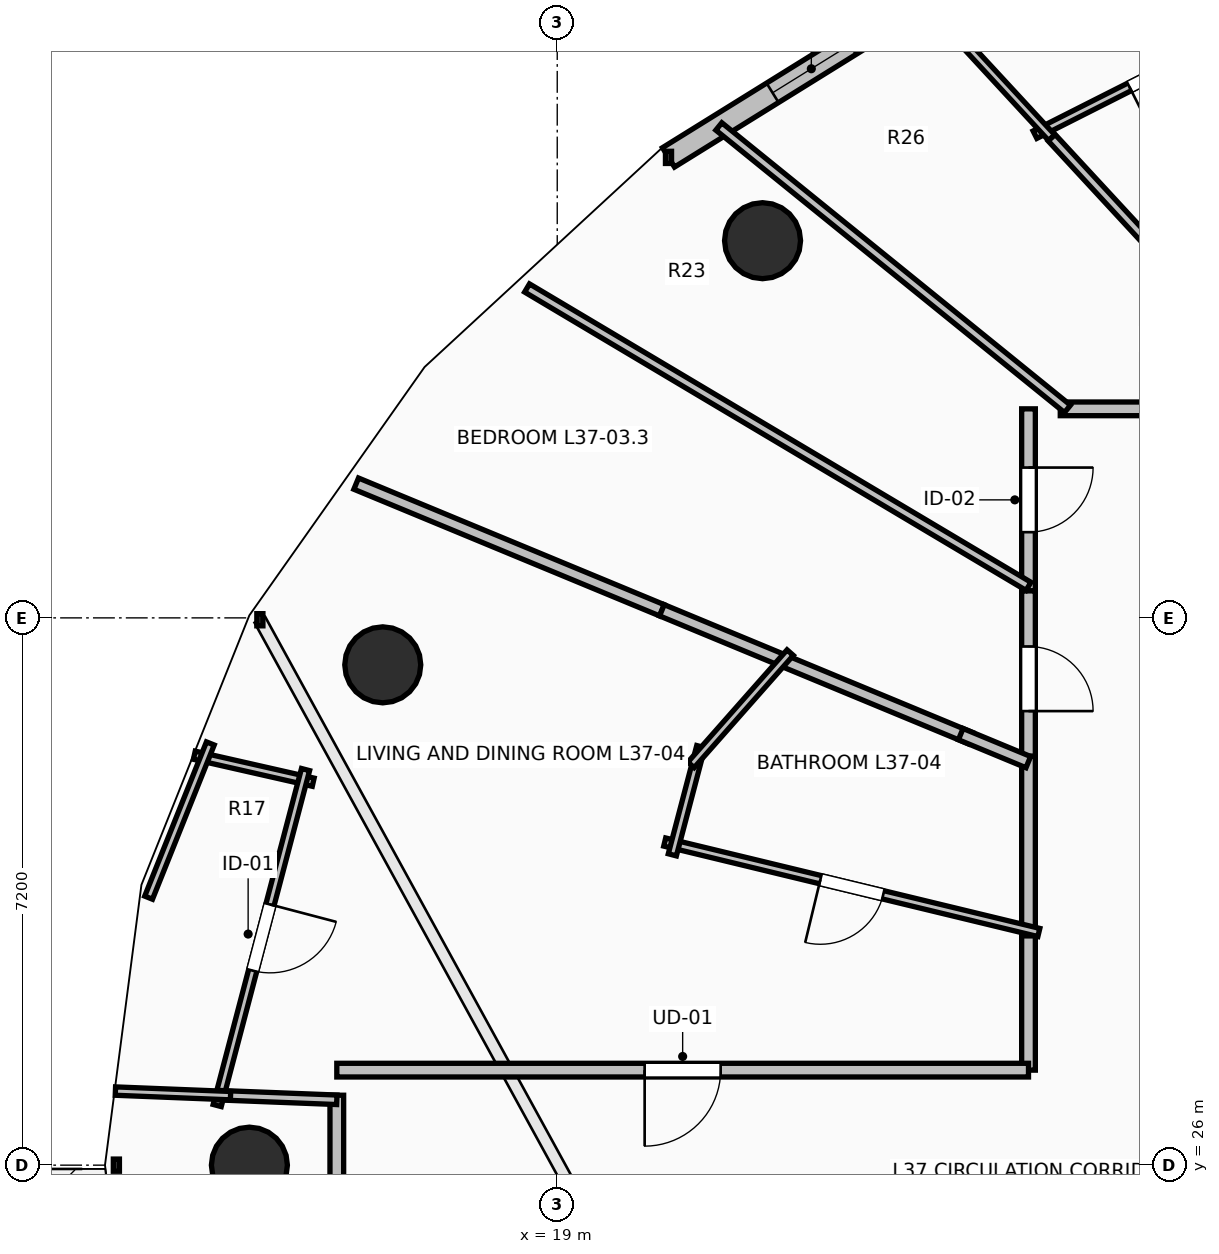
"""IFC4 building model, lengths in metres.
Left out: names, types, materials, properties, quantities, classifications, styles, units other than length and angle.
Written with IfcOpenShell. Run it as: python <this file> out.ifc"""

import sys

from ifc_helpers import new_model, si_unit, direction, frame, frame_2d, origin, origin_2d, place, context, subcontext, project, spatial, rectangle, circle, extrude, element, fill, save


model = new_model("IFC4")
c1 = context("Model", 3, precision=1e-05, world=origin(), true_north=direction((0.0, 1.0)))
c2 = subcontext(c1, "Body", "Model", "MODEL_VIEW")
j1 = project(units=[si_unit("LENGTHUNIT", "METRE"), si_unit("PLANEANGLEUNIT", "RADIAN")], contexts=[c1])
p1 = place(None, origin())
s1 = spatial("IfcSite", under=j1, at=p1, CompositionType="ELEMENT")
p2 = place(p1, origin())
s2 = spatial("IfcBuilding", under=s1, at=p2, CompositionType="ELEMENT")
p3 = place(p2, frame((0.0, 0.0, 139.6)))
s3 = spatial("IfcBuildingStorey", under=s2, at=p3, CompositionType="ELEMENT", Elevation=139.6)
for number, where, z_axis, x_axis in (
    (1, (21.701, 38.162, 0.0), (0.0, 0.0, 1.0), (-0.707, 0.707, 0.0)),
    (2, (16.705, 32.582, 0.0), (0.0, 0.0, 1.0), (-0.924, 0.383, 0.0)),
    (3, (14.95, 26.0, 0.0), (0.0, 0.0, 1.0), (-1.0, 0.0, 0.0)),
):
    element("IfcColumn", number, at=place(p3, frame(where, z_axis=z_axis, x_axis=x_axis)), inside=s3, PredefinedType="COLUMN", context=c2, shape_type="SweptSolid", body=[
        extrude(circle(Radius=0.5, at=origin_2d()), origin(), (0.0, 0.0, 1.0), 3.5),
    ])
p4 = place(p3, frame((24.222, 41.59, 0.0), z_axis=(0.0, 0.0, 1.0), x_axis=(-0.849721181976, -0.527232313977, 0.0)))
e4 = element("IfcWall", 4, at=p4, inside=s3, PredefinedType="STANDARD", context=c2, shape_type="SweptSolid", body=[
    extrude(rectangle(XDim=4.423, YDim=0.3, at=frame_2d((2.211, 0.0))), origin(), (0.0, 0.0, 1.0), 3.24),
])
p5 = place(p4, frame((1.611, 0.0, 0.85)))
e5 = element("IfcOpeningElement", 5, at=p5, cuts=e4, PredefinedType="OPENING", context=c2, shape_type="SweptSolid", body=[
    extrude(rectangle(XDim=1.2, YDim=1.95, at=frame_2d((0.6, 0.975))), frame((0.0, 0.165, 0.0), z_axis=(0.0, -1.0, 0.0), x_axis=(1.0, 0.0, 0.0)), (0.0, 0.0, 1.0), 0.33),
])
p6 = place(p3, frame((28.72, 35.95, 0.0), z_axis=(0.0, 0.0, 1.0), x_axis=(-1.0, 0.0, 0.0)))
e6 = element("IfcWall", 6, at=p6, inside=s3, PredefinedType="PARTITIONING", context=c2, shape_type="SweptSolid", body=[
    extrude(rectangle(XDim=3.102, YDim=0.18, at=frame_2d((1.551, 0.0))), origin(), (0.0, 0.0, 1.0), 2.432),
])
p7 = place(p3, frame((25.2, 35.95, 0.0), z_axis=(0.0, 0.0, 1.0), x_axis=(0.0, -1.0, 0.0)))
e7 = element("IfcWall", 7, at=p7, inside=s3, PredefinedType="PARTITIONING", context=c2, shape_type="SweptSolid", body=[
    extrude(rectangle(XDim=2.395, YDim=0.18, at=frame_2d((1.198, 0.0))), origin(), (0.0, 0.0, 1.0), 2.432),
])
p8 = place(p7, frame((0.772, 0.0, 0.0)))
e8 = element("IfcOpeningElement", 8, at=p8, cuts=e7, PredefinedType="OPENING", context=c2, shape_type="SweptSolid", body=[
    extrude(rectangle(XDim=0.85, YDim=2.1, at=frame_2d((0.425, 1.05))), frame((0.0, 0.105, 0.0), z_axis=(0.0, -1.0, 0.0), x_axis=(1.0, 0.0, 0.0)), (0.0, 0.0, 1.0), 0.21),
])
p9 = place(p3, frame((25.2, 33.555, 0.0), z_axis=(0.0, 0.0, 1.0), x_axis=(0.0, -1.0, 0.0)))
e9 = element("IfcWall", 9, at=p9, inside=s3, PredefinedType="PARTITIONING", context=c2, shape_type="SweptSolid", body=[
    extrude(rectangle(XDim=2.313, YDim=0.18, at=frame_2d((1.156, 0.0))), origin(), (0.0, 0.0, 1.0), 3.24),
])
p10 = place(p9, frame((0.731, 0.0, 0.0)))
e10 = element("IfcOpeningElement", 10, at=p10, cuts=e9, PredefinedType="OPENING", context=c2, shape_type="SweptSolid", body=[
    extrude(rectangle(XDim=0.85, YDim=2.1, at=frame_2d((0.425, 1.05))), frame((0.0, 0.105, 0.0), z_axis=(0.0, -1.0, 0.0), x_axis=(1.0, 0.0, 0.0)), (0.0, 0.0, 1.0), 0.21),
])
p11 = place(p3, frame((25.2, 29.156, 0.0), z_axis=(0.0, 0.0, 1.0), x_axis=(0.0, -1.0, 0.0)))
e11 = element("IfcWall", 11, at=p11, inside=s3, PredefinedType="PARTITIONING", context=c2, shape_type="SweptSolid", body=[
    extrude(rectangle(XDim=1.906, YDim=0.18, at=frame_2d((0.953, 0.0))), origin(), (0.0, 0.0, 1.0), 2.432),
])
p12 = place(p3, frame((25.2, 27.25, 0.0), z_axis=(0.0, 0.0, 1.0), x_axis=(-1.0, 0.0, 0.0)))
e12 = element("IfcWall", 12, at=p12, inside=s3, PredefinedType="PARTITIONING", context=c2, shape_type="SweptSolid", body=[
    extrude(rectangle(XDim=9.1, YDim=0.18, at=frame_2d((4.55, 0.0))), origin(), (0.0, 0.0, 1.0), 2.432),
])
p13 = place(p12, frame((4.05, 0.0, 0.0)))
e13 = element("IfcOpeningElement", 13, at=p13, cuts=e12, PredefinedType="OPENING", context=c2, shape_type="SweptSolid", body=[
    extrude(rectangle(XDim=1.0, YDim=2.15, at=frame_2d((0.5, 1.075))), frame((0.0, 0.105, 0.0), z_axis=(0.0, -1.0, 0.0), x_axis=(1.0, 0.0, 0.0)), (0.0, 0.0, 1.0), 0.21),
])
p14 = place(p3, frame((25.2, 31.382, 0.0), z_axis=(0.0, 0.0, 1.0), x_axis=(0.0, -1.0, 0.0)))
e14 = element("IfcWall", 14, at=p14, inside=s3, PredefinedType="PARTITIONING", context=c2, shape_type="SweptSolid", body=[
    extrude(rectangle(XDim=2.366, YDim=0.18, at=frame_2d((1.183, 0.0))), origin(), (0.0, 0.0, 1.0), 2.432),
])
p15 = place(p3, frame((16.1, 26.92, 0.0), z_axis=(0.0, 0.0, 1.0), x_axis=(0.0, -1.0, 0.0)))
e15 = element("IfcWall", 15, at=p15, inside=s3, PredefinedType="PARTITIONING", context=c2, shape_type="SweptSolid", body=[
    extrude(rectangle(XDim=2.37, YDim=0.18, at=frame_2d((1.185, 0.0))), origin(), (0.0, 0.0, 1.0), 2.432),
])
p16 = place(p3, frame((28.574, 41.219, 0.0), z_axis=(0.0, 0.0, 1.0), x_axis=(-0.892470920122, -0.451104928744, 0.0)))
e16 = element("IfcWall", 16, at=p16, inside=s3, PredefinedType="PARTITIONING", context=c2, shape_type="SweptSolid", body=[
    extrude(rectangle(XDim=3.685, YDim=0.11, at=frame_2d((1.843, 0.0))), origin(), (0.0, 0.0, 1.0), 3.24),
])
p17 = place(p16, frame((1.393, 0.0, 0.0)))
e17 = element("IfcOpeningElement", 17, at=p17, cuts=e16, PredefinedType="OPENING", context=c2, shape_type="SweptSolid", body=[
    extrude(rectangle(XDim=0.9, YDim=2.1, at=frame_2d((0.45, 1.05))), frame((0.0, 0.07, 0.0), z_axis=(0.0, -1.0, 0.0), x_axis=(1.0, 0.0, 0.0)), (0.0, 0.0, 1.0), 0.14),
])
p18 = place(p3, frame((25.505, 39.517, 0.0), z_axis=(0.0, 0.0, 1.0), x_axis=(-0.678720806978, 0.734396395808, 0.0)))
e18 = element("IfcWall", 18, at=p18, inside=s3, PredefinedType="PARTITIONING", context=c2, shape_type="SweptSolid", body=[
    extrude(rectangle(XDim=2.622, YDim=0.11, at=frame_2d((1.311, 0.0))), origin(), (0.0, 0.0, 1.0), 2.728),
])
p19 = place(p3, frame((25.505, 39.517, 0.0), z_axis=(0.0, 0.0, 1.0), x_axis=(0.678766339668, -0.734354312395, 0.0)))
e19 = element("IfcWall", 19, at=p19, inside=s3, PredefinedType="PARTITIONING", context=c2, shape_type="SweptSolid", body=[
    extrude(rectangle(XDim=4.857, YDim=0.125, at=frame_2d((2.429, 0.0))), origin(), (0.0, 0.0, 1.0), 2.432),
])
p20 = place(p19, frame((1.979, 0.0, 0.0)))
e20 = element("IfcOpeningElement", 20, at=p20, cuts=e19, PredefinedType="OPENING", context=c2, shape_type="SweptSolid", body=[
    extrude(rectangle(XDim=0.9, YDim=2.1, at=frame_2d((0.45, 1.05))), frame((0.0, 0.077, 0.0), z_axis=(0.0, -1.0, 0.0), x_axis=(1.0, 0.0, 0.0)), (0.0, 0.0, 1.0), 0.155),
])
p21 = place(p3, frame((21.126, 39.665, 0.0), z_axis=(0.0, 0.0, 1.0), x_axis=(0.777089771819, -0.629389773141, 0.0)))
e21 = element("IfcWall", 21, at=p21, inside=s3, PredefinedType="PARTITIONING", context=c2, shape_type="SweptSolid", body=[
    extrude(rectangle(XDim=5.903, YDim=0.125, at=frame_2d((2.951, 0.0))), origin(), (0.0, 0.0, 1.0), 2.728),
])
p22 = place(p3, frame((18.603, 37.54, 0.0), z_axis=(0.0, 0.0, 1.0), x_axis=(0.859389720334, -0.511321140365, 0.0)))
e22 = element("IfcWall", 22, at=p22, inside=s3, PredefinedType="PARTITIONING", context=c2, shape_type="SweptSolid", body=[
    extrude(rectangle(XDim=7.676, YDim=0.125, at=frame_2d((3.838, 0.0))), origin(), (0.0, 0.0, 1.0), 2.728),
])
p23 = place(p3, frame((16.355, 34.966, 0.0), z_axis=(0.0, 0.0, 1.0), x_axis=(0.923874659351, -0.382695197002, 0.0)))
e23 = element("IfcWall", 23, at=p23, inside=s3, PredefinedType="PARTITIONING", context=c2, shape_type="SweptSolid", body=[
    extrude(rectangle(XDim=4.353, YDim=0.16, at=frame_2d((2.177, 0.0))), origin(), (0.0, 0.0, 1.0), 2.728),
])
p24 = place(p3, frame((20.377, 33.3, 0.0), z_axis=(0.0, 0.0, 1.0), x_axis=(0.923801529802, -0.382871693306, 0.0)))
e24 = element("IfcWall", 24, at=p24, inside=s3, PredefinedType="PARTITIONING", context=c2, shape_type="SweptSolid", body=[
    extrude(rectangle(XDim=4.396, YDim=0.16, at=frame_2d((2.198, 0.0))), origin(), (0.0, 0.0, 1.0), 2.922),
])
p25 = place(p3, frame((24.309, 31.671, 0.0), z_axis=(0.0, 0.0, 1.0), x_axis=(0.923855963606, -0.38274032778, 0.0)))
e25 = element("IfcWall", 25, at=p25, inside=s3, PredefinedType="PARTITIONING", context=c2, shape_type="SweptSolid", body=[
    extrude(rectangle(XDim=0.962, YDim=0.16, at=frame_2d((0.481, 0.0))), origin(), (0.0, 0.0, 1.0), 2.972),
])
p26 = place(p3, frame((25.336, 29.061, 0.0), z_axis=(0.0, 0.0, 1.0), x_axis=(-0.972001766098, 0.234973544686, 0.0)))
e26 = element("IfcWall", 26, at=p26, inside=s3, PredefinedType="PARTITIONING", context=c2, shape_type="SweptSolid", body=[
    extrude(rectangle(XDim=5.064, YDim=0.11, at=frame_2d((2.532, 0.0))), origin(), (0.0, 0.0, 1.0), 2.432),
])
p27 = place(p26, frame((2.107, 0.0, 0.0)))
e27 = element("IfcOpeningElement", 27, at=p27, cuts=e26, PredefinedType="OPENING", context=c2, shape_type="SweptSolid", body=[
    extrude(rectangle(XDim=0.85, YDim=2.1, at=frame_2d((0.425, 1.05))), frame((0.0, 0.07, 0.0), z_axis=(0.0, -1.0, 0.0), x_axis=(1.0, 0.0, 0.0)), (0.0, 0.0, 1.0), 0.14),
])
p28 = place(p3, frame((20.514, 30.083, 0.0), z_axis=(0.0, 0.0, 1.0), x_axis=(0.254223916145, 0.967145387447, 0.0)))
e28 = element("IfcWall", 28, at=p28, inside=s3, PredefinedType="PARTITIONING", context=c2, shape_type="SweptSolid", body=[
    extrude(rectangle(XDim=1.472, YDim=0.11, at=frame_2d((0.736, 0.0))), origin(), (0.0, 0.0, 1.0), 2.432),
])
p29 = place(p3, frame((20.76, 31.266, 0.0), z_axis=(0.0, 0.0, 1.0), x_axis=(0.662014950831, 0.749490630279, 0.0)))
e29 = element("IfcWall", 29, at=p29, inside=s3, PredefinedType="PARTITIONING", context=c2, shape_type="SweptSolid", body=[
    extrude(rectangle(XDim=1.97, YDim=0.11, at=frame_2d((0.985, 0.0))), origin(), (0.0, 0.0, 1.0), 2.922),
])
p30 = place(p3, frame((14.226, 31.393, 0.0), z_axis=(0.0, 0.0, 1.0), x_axis=(0.975195623383, -0.221344744989, 0.0)))
e30 = element("IfcWall", 30, at=p30, inside=s3, PredefinedType="PARTITIONING", context=c2, shape_type="SweptSolid", body=[
    extrude(rectangle(XDim=1.604, YDim=0.11, at=frame_2d((0.802, 0.0))), origin(), (0.0, 0.0, 1.0), 3.24),
])
p31 = place(p3, frame((15.689, 31.204, 0.0), z_axis=(0.0, 0.0, 1.0), x_axis=(-0.254346037576, -0.967113278354, 0.0)))
e31 = element("IfcWall", 31, at=p31, inside=s3, PredefinedType="PARTITIONING", context=c2, shape_type="SweptSolid", body=[
    extrude(rectangle(XDim=4.57, YDim=0.11, at=frame_2d((2.285, 0.0))), origin(), (0.0, 0.0, 1.0), 3.24),
])
p32 = place(p31, frame((1.835, 0.0, 0.0)))
e32 = element("IfcOpeningElement", 32, at=p32, cuts=e31, PredefinedType="OPENING", context=c2, shape_type="SweptSolid", body=[
    extrude(rectangle(XDim=0.9, YDim=2.1, at=frame_2d((0.45, 1.05))), frame((0.0, 0.07, 0.0), z_axis=(0.0, -1.0, 0.0), x_axis=(1.0, 0.0, 0.0)), (0.0, 0.0, 1.0), 0.14),
])
p33 = place(p3, frame((14.436, 31.548, 0.0), z_axis=(0.0, 0.0, 1.0), x_axis=(-0.371544752876, -0.928415045446, 0.0)))
e33 = element("IfcWall", 33, at=p33, inside=s3, PredefinedType="PARTITIONING", context=c2, shape_type="SweptSolid", body=[
    extrude(rectangle(XDim=2.186, YDim=0.11, at=frame_2d((1.093, 0.0))), origin(), (0.0, 0.0, 1.0), 3.24),
])
p34 = place(p3, frame((14.562, 26.92, 0.0), z_axis=(0.0, 0.0, 1.0), x_axis=(0.999244683777, -0.03885951548, 0.0)))
e34 = element("IfcWall", 34, at=p34, inside=s3, PredefinedType="PARTITIONING", context=c2, shape_type="SweptSolid", body=[
    extrude(rectangle(XDim=1.539, YDim=0.125, at=frame_2d((0.77, 0.0))), origin(), (0.0, 0.0, 1.0), 2.728),
])
p35 = place(p3, frame((13.187, 26.975, 0.0), z_axis=(0.0, 0.0, 1.0), x_axis=(0.999208657324, -0.039775106907, 0.0)))
e35 = element("IfcWall", 35, at=p35, inside=s3, PredefinedType="PARTITIONING", context=c2, shape_type="SweptSolid", body=[
    extrude(rectangle(XDim=1.516, YDim=0.11, at=frame_2d((0.758, 0.0))), origin(), (0.0, 0.0, 1.0), 3.24),
])
p36 = place(p5, origin())
e36 = element("IfcWindow", 36, at=p36, inside=s3, PartitioningType="SINGLE_PANEL", PredefinedType="WINDOW", context=c2, shape_type="SweptSolid", body=[
    extrude(rectangle(XDim=1.2, YDim=1.95, at=frame_2d((0.6, 0.975))), frame((0.0, 0.03, 0.0), z_axis=(0.0, -1.0, 0.0), x_axis=(1.0, 0.0, 0.0)), (0.0, 0.0, 1.0), 0.06),
])
fill(e5, e36)
p37 = place(p13, origin())
e37 = element("IfcDoor", 37, at=p37, inside=s3, OperationType="SINGLE_SWING_RIGHT", PredefinedType="DOOR", context=c2, shape_type="SweptSolid", body=[
    extrude(rectangle(XDim=1.0, YDim=2.15, at=frame_2d((0.5, 1.075))), frame((0.0, 0.025, 0.0), z_axis=(0.0, -1.0, 0.0), x_axis=(1.0, 0.0, 0.0)), (0.0, 0.0, 1.0), 0.05),
])
fill(e13, e37)
p38 = place(p17, origin())
e38 = element("IfcDoor", 38, at=p38, inside=s3, OperationType="SINGLE_SWING_RIGHT", PredefinedType="DOOR", context=c2, shape_type="SweptSolid", body=[
    extrude(rectangle(XDim=0.9, YDim=2.1, at=frame_2d((0.45, 1.05))), frame((0.0, 0.025, 0.0), z_axis=(0.0, -1.0, 0.0), x_axis=(1.0, 0.0, 0.0)), (0.0, 0.0, 1.0), 0.05),
])
fill(e17, e38)
p39 = place(p27, origin())
e39 = element("IfcDoor", 39, at=p39, inside=s3, OperationType="SINGLE_SWING_RIGHT", PredefinedType="DOOR", context=c2, shape_type="SweptSolid", body=[
    extrude(rectangle(XDim=0.85, YDim=2.1, at=frame_2d((0.425, 1.05))), frame((0.0, 0.025, 0.0), z_axis=(0.0, -1.0, 0.0), x_axis=(1.0, 0.0, 0.0)), (0.0, 0.0, 1.0), 0.05),
])
fill(e27, e39)
p40 = place(p32, origin())
e40 = element("IfcDoor", 40, at=p40, inside=s3, OperationType="SINGLE_SWING_LEFT", PredefinedType="DOOR", context=c2, shape_type="SweptSolid", body=[
    extrude(rectangle(XDim=0.9, YDim=2.1, at=frame_2d((0.45, 1.05))), frame((0.0, 0.025, 0.0), z_axis=(0.0, -1.0, 0.0), x_axis=(1.0, 0.0, 0.0)), (0.0, 0.0, 1.0), 0.05),
])
fill(e32, e40)
p41 = place(p8, origin())
e41 = element("IfcDoor", 41, at=p41, inside=s3, OperationType="SINGLE_SWING_LEFT", PredefinedType="DOOR", context=c2, shape_type="SweptSolid", body=[
    extrude(rectangle(XDim=0.85, YDim=2.1, at=frame_2d((0.425, 1.05))), frame((0.0, 0.025, 0.0), z_axis=(0.0, -1.0, 0.0), x_axis=(1.0, 0.0, 0.0)), (0.0, 0.0, 1.0), 0.05),
])
fill(e8, e41)
p42 = place(p10, origin())
e42 = element("IfcDoor", 42, at=p42, inside=s3, OperationType="SINGLE_SWING_RIGHT", PredefinedType="DOOR", context=c2, shape_type="SweptSolid", body=[
    extrude(rectangle(XDim=0.85, YDim=2.1, at=frame_2d((0.425, 1.05))), frame((0.0, 0.025, 0.0), z_axis=(0.0, -1.0, 0.0), x_axis=(1.0, 0.0, 0.0)), (0.0, 0.0, 1.0), 0.05),
])
fill(e10, e42)
save(model, sys.argv[1])
